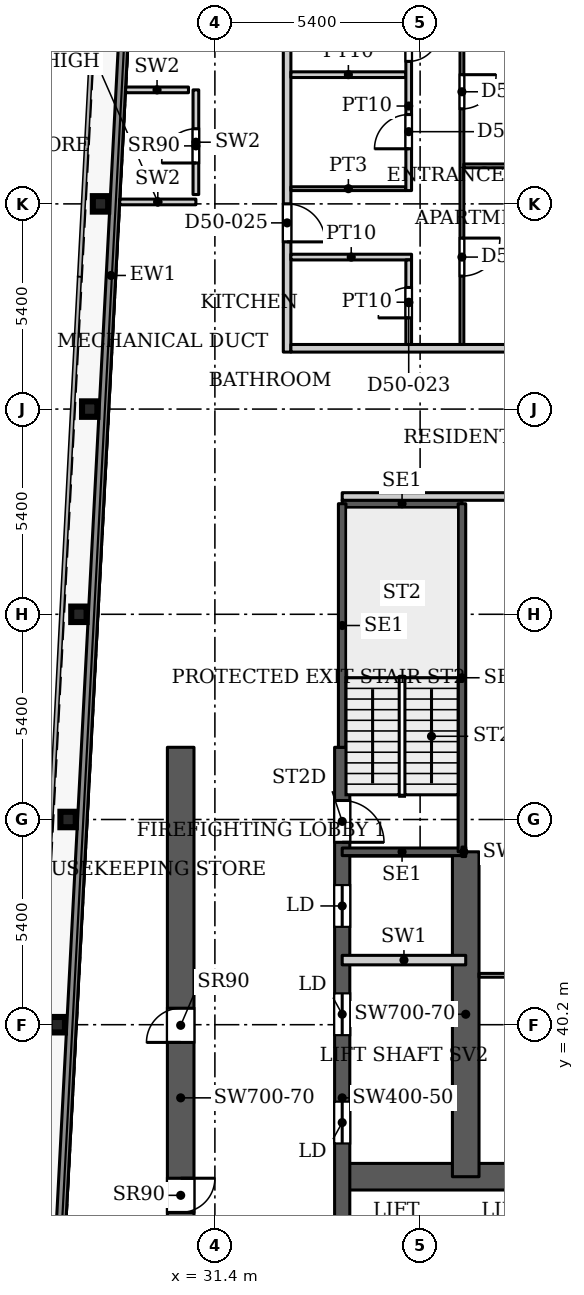
"""IFC4 building model, lengths in metres.
Left out: names, types, materials, properties, quantities, classifications, styles, units other than length and angle.
Written with IfcOpenShell. Run it as: python <this file> out.ifc"""

import sys

from ifc_helpers import new_model, si_unit, direction, frame, frame_2d, origin, origin_2d, place, context, subcontext, project, spatial, rectangle, i_section, extrude, source, transform, mapped, element, fill, save


model = new_model("IFC4")
c1 = context("Model", 3, precision=1e-05, world=origin(), true_north=direction((0.0, 1.0)))
c2 = subcontext(c1, "Body", "Model", "MODEL_VIEW")
j1 = project(units=[si_unit("LENGTHUNIT", "METRE"), si_unit("PLANEANGLEUNIT", "RADIAN")], contexts=[c1])
p1 = place(None, origin())
s1 = spatial("IfcSite", under=j1, at=p1, CompositionType="ELEMENT")
p2 = place(p1, origin())
s2 = spatial("IfcBuilding", under=s1, at=p2, CompositionType="ELEMENT")
p3 = place(p2, frame((0.0, 0.0, 216.2)))
s3 = spatial("IfcBuildingStorey", under=s2, at=p3, CompositionType="ELEMENT", Elevation=216.2)
for number, where, z_axis, x_axis in (
    (1, (27.253, 40.2, 0.0), (0.0, 0.0, 1.0), (1.0, 0.0, 0.0)),
    (2, (27.537, 45.6, 0.0), (0.0, 0.0, 1.0), (1.0, 0.0, 0.0)),
    (3, (27.822, 51.0, 0.0), (0.0, 0.0, 1.0), (1.0, 0.0, 0.0)),
    (4, (28.106, 56.4, 0.0), (0.0, 0.0, 1.0), (1.0, 0.0, 0.0)),
    (5, (28.39, 61.8, 0.0), (0.0, 0.0, 1.0), (1.0, 0.0, 0.0)),
):
    element("IfcColumn", number, at=place(p3, frame(where, z_axis=z_axis, x_axis=x_axis)), inside=s3, PredefinedType="COLUMN", context=c2, shape_type="SweptSolid", body=[
        extrude(i_section(OverallWidth=0.404, OverallDepth=0.407, WebThickness=0.027, FlangeThickness=0.044, FilletRadius=0.012, at=origin_2d()), origin(), (0.0, 0.0, 1.0), 3.9),
    ])
p4 = place(p3, frame((34.75, 36.2, 0.0), z_axis=(0.0, 0.0, 1.0), x_axis=(1.0, 0.0, 0.0)))
e6 = element("IfcWall", 6, at=p4, inside=s3, PredefinedType="SHEAR", context=c2, shape_type="SweptSolid", body=[
    extrude(rectangle(XDim=18.4, YDim=0.7, at=frame_2d((9.2, 0.0))), origin(), (0.0, 0.0, 1.0), 3.9),
])
p5 = place(p4, frame((16.9, 0.0, 0.0)))
e7 = element("IfcOpeningElement", 7, at=p5, cuts=e6, PredefinedType="OPENING", context=c2, shape_type="SweptSolid", body=[
    extrude(rectangle(XDim=1.0, YDim=2.2, at=frame_2d((0.5, 1.1))), frame((0.0, 0.36, 0.0), z_axis=(0.0, -1.0, 0.0), x_axis=(1.0, 0.0, 0.0)), (0.0, 0.0, 1.0), 0.72),
])
p6 = place(p3, frame((34.75, 29.05, 0.0), z_axis=(0.0, 0.0, 1.0), x_axis=(0.0, 1.0, 0.0)))
e8 = element("IfcWall", 8, at=p6, inside=s3, PredefinedType="SHEAR", context=c2, shape_type="SweptSolid", body=[
    extrude(rectangle(XDim=18.45, YDim=0.4, at=frame_2d((9.225, 0.0))), origin(), (0.0, 0.0, 1.0), 3.9),
])
p7 = place(p6, frame((8.025, 0.0, 0.0)))
e9 = element("IfcOpeningElement", 9, at=p7, cuts=e8, PredefinedType="OPENING", context=c2, shape_type="SweptSolid", body=[
    extrude(rectangle(XDim=1.1, YDim=2.2, at=frame_2d((0.55, 1.1))), frame((0.0, 0.21, 0.0), z_axis=(0.0, -1.0, 0.0), x_axis=(1.0, 0.0, 0.0)), (0.0, 0.0, 1.0), 0.42),
])
p8 = place(p6, frame((10.875, 0.0, 0.0)))
e10 = element("IfcOpeningElement", 10, at=p8, cuts=e8, PredefinedType="OPENING", context=c2, shape_type="SweptSolid", body=[
    extrude(rectangle(XDim=1.1, YDim=2.2, at=frame_2d((0.55, 1.1))), frame((0.0, 0.21, 0.0), z_axis=(0.0, -1.0, 0.0), x_axis=(1.0, 0.0, 0.0)), (0.0, 0.0, 1.0), 0.42),
])
p9 = place(p6, frame((13.725, 0.0, 0.0)))
e11 = element("IfcOpeningElement", 11, at=p9, cuts=e8, PredefinedType="OPENING", context=c2, shape_type="SweptSolid", body=[
    extrude(rectangle(XDim=1.1, YDim=2.2, at=frame_2d((0.55, 1.1))), frame((0.0, 0.21, 0.0), z_axis=(0.0, -1.0, 0.0), x_axis=(1.0, 0.0, 0.0)), (0.0, 0.0, 1.0), 0.42),
])
p10 = place(p6, frame((15.95, 0.0, 0.0)))
e12 = element("IfcOpeningElement", 12, at=p10, cuts=e8, PredefinedType="OPENING", context=c2, shape_type="SweptSolid", body=[
    extrude(rectangle(XDim=1.1, YDim=2.2, at=frame_2d((0.55, 1.1))), frame((0.0, 0.21, 0.0), z_axis=(0.0, -1.0, 0.0), x_axis=(1.0, 0.0, 0.0)), (0.0, 0.0, 1.0), 0.42),
])
p11 = place(p3, frame((38.0, 36.2, 0.0), z_axis=(0.0, 0.0, 1.0), x_axis=(0.0, 1.0, 0.0)))
e13 = element("IfcWall", 13, at=p11, inside=s3, PredefinedType="SHEAR", context=c2, shape_type="SweptSolid", body=[
    extrude(rectangle(XDim=8.55, YDim=0.7, at=frame_2d((4.275, 0.0))), origin(), (0.0, 0.0, 1.0), 3.9),
])
p12 = place(p3, frame((30.5, 29.05, 0.0), z_axis=(0.0, 0.0, 1.0), x_axis=(0.0, 1.0, 0.0)))
e14 = element("IfcWall", 14, at=p12, inside=s3, PredefinedType="SHEAR", context=c2, shape_type="SweptSolid", body=[
    extrude(rectangle(XDim=18.45, YDim=0.7, at=frame_2d((9.225, 0.0))), origin(), (0.0, 0.0, 1.0), 3.9),
])
p13 = place(p12, frame((6.21, 0.0, 0.0)))
e15 = element("IfcOpeningElement", 15, at=p13, cuts=e14, PredefinedType="OPENING", context=c2, shape_type="SweptSolid", body=[
    extrude(rectangle(XDim=0.9, YDim=2.2, at=frame_2d((0.45, 1.1))), frame((0.0, 0.36, 0.0), z_axis=(0.0, -1.0, 0.0), x_axis=(1.0, 0.0, 0.0)), (0.0, 0.0, 1.0), 0.72),
])
p14 = place(p12, frame((10.684, 0.0, 0.0)))
e16 = element("IfcOpeningElement", 16, at=p14, cuts=e14, PredefinedType="OPENING", context=c2, shape_type="SweptSolid", body=[
    extrude(rectangle(XDim=0.9, YDim=2.2, at=frame_2d((0.45, 1.1))), frame((0.0, 0.36, 0.0), z_axis=(0.0, -1.0, 0.0), x_axis=(1.0, 0.0, 0.0)), (0.0, 0.0, 1.0), 0.72),
])
p15 = place(p3, frame((27.195, 31.969, 0.0), z_axis=(0.0, 0.0, 1.0), x_axis=(0.052559748861, 0.998617781135, 0.0)))
e17 = element("IfcWall", 17, at=p15, inside=s3, PredefinedType="SOLIDWALL", context=c2, shape_type="SweptSolid", body=[
    extrude(rectangle(XDim=55.972, YDim=0.25, at=frame_2d((27.986, 0.0))), origin(), (0.0, 0.0, 1.0), 3.75),
])
for number, where, z_axis, x_axis in (
    (18, (34.75, 44.75, 0.0), (0.0, 0.0, 1.0), (1.0, 0.0, 0.0)),
    (19, (34.75, 53.91, 0.0), (0.0, 0.0, 1.0), (1.0, 0.0, 0.0)),
):
    element("IfcWall", number, at=place(p3, frame(where, z_axis=z_axis, x_axis=x_axis)), inside=s3, PredefinedType="SHEAR", context=c2, shape_type="SweptSolid", body=[
        extrude(rectangle(XDim=3.15, YDim=0.2, at=frame_2d((1.575, 0.0))), origin(), (0.0, 0.0, 1.0), 3.9),
    ])
p16 = place(p3, frame((34.75, 47.5, 0.0), z_axis=(0.0, 0.0, 1.0), x_axis=(0.0, 1.0, 0.0)))
e20 = element("IfcWall", 20, at=p16, inside=s3, PredefinedType="SHEAR", context=c2, shape_type="SweptSolid", body=[
    extrude(rectangle(XDim=6.41, YDim=0.2, at=frame_2d((3.205, 0.0))), origin(), (0.0, 0.0, 1.0), 3.9),
])
p17 = place(p3, frame((37.9, 44.75, 0.0), z_axis=(0.0, 0.0, 1.0), x_axis=(0.0, 1.0, 0.0)))
e21 = element("IfcWall", 21, at=p17, inside=s3, PredefinedType="SHEAR", context=c2, shape_type="SweptSolid", body=[
    extrude(rectangle(XDim=9.16, YDim=0.2, at=frame_2d((4.58, 0.0))), origin(), (0.0, 0.0, 1.0), 3.9),
])
p18 = place(p3, frame((34.75, 41.9, 0.0), z_axis=(0.0, 0.0, 1.0), x_axis=(1.0, 0.0, 0.0)))
e22 = element("IfcWall", 22, at=p18, inside=s3, PredefinedType="PARTITIONING", context=c2, shape_type="SweptSolid", body=[
    extrude(rectangle(XDim=3.25, YDim=0.25, at=frame_2d((1.625, 0.0))), origin(), (0.0, 0.0, 1.0), 3.9),
])
p19 = place(p3, frame((37.9, 44.75, 0.0), z_axis=(0.0, 0.0, 1.0), x_axis=(1.0, 0.0, 0.0)))
e23 = element("IfcWall", 23, at=p19, inside=s3, PredefinedType="PARTITIONING", context=c2, shape_type="SweptSolid", body=[
    extrude(rectangle(XDim=0.1, YDim=0.25, at=frame_2d((0.05, 0.0))), origin(), (0.0, 0.0, 1.0), 3.9),
])
p20 = place(p3, frame((28.896, 61.851, 0.0), z_axis=(0.0, 0.0, 1.0), x_axis=(1.0, 0.0, 0.0)))
e24 = element("IfcWall", 24, at=p20, inside=s3, PredefinedType="PARTITIONING", context=c2, shape_type="SweptSolid", body=[
    extrude(rectangle(XDim=2.004, YDim=0.15, at=frame_2d((1.002, 0.0))), origin(), (0.0, 0.0, 1.0), 3.072),
])
p21 = place(p3, frame((30.9, 62.046, 0.0), z_axis=(0.0, 0.0, 1.0), x_axis=(0.0, 1.0, 0.0)))
e25 = element("IfcWall", 25, at=p21, inside=s3, PredefinedType="PARTITIONING", context=c2, shape_type="SweptSolid", body=[
    extrude(rectangle(XDim=2.754, YDim=0.15, at=frame_2d((1.377, 0.0))), origin(), (0.0, 0.0, 1.0), 3.9),
])
p22 = place(p21, frame((0.83, 0.0, 0.0)))
e26 = element("IfcOpeningElement", 26, at=p22, cuts=e25, PredefinedType="OPENING", context=c2, shape_type="SweptSolid", body=[
    extrude(rectangle(XDim=0.9, YDim=2.2, at=frame_2d((0.45, 1.1))), frame((0.0, 0.085, 0.0), z_axis=(0.0, -1.0, 0.0), x_axis=(1.0, 0.0, 0.0)), (0.0, 0.0, 1.0), 0.17),
])
p23 = place(p3, frame((29.051, 64.8, 0.0), z_axis=(0.0, 0.0, 1.0), x_axis=(1.0, 0.0, 0.0)))
e27 = element("IfcWall", 27, at=p23, inside=s3, PredefinedType="PARTITIONING", context=c2, shape_type="SweptSolid", body=[
    extrude(rectangle(XDim=1.654, YDim=0.15, at=frame_2d((0.827, 0.0))), origin(), (0.0, 0.0, 1.0), 3.9),
])
p24 = place(p3, frame((33.3, 57.9, 0.0), z_axis=(0.0, 0.0, 1.0), x_axis=(0.0, 1.0, 0.0)))
e28 = element("IfcWall", 28, at=p24, inside=s3, PredefinedType="PARTITIONING", context=c2, shape_type="SweptSolid", body=[
    extrude(rectangle(XDim=17.6, YDim=0.2, at=frame_2d((8.8, 0.0))), origin(), (0.0, 0.0, 1.0), 3.6),
])
p25 = place(p24, frame((2.9, 0.0, 0.0)))
e29 = element("IfcOpeningElement", 29, at=p25, cuts=e28, PredefinedType="OPENING", context=c2, shape_type="SweptSolid", body=[
    extrude(rectangle(XDim=1.0, YDim=2.1, at=frame_2d((0.5, 1.05))), frame((0.0, 0.11, 0.0), z_axis=(0.0, -1.0, 0.0), x_axis=(1.0, 0.0, 0.0)), (0.0, 0.0, 1.0), 0.22),
])
p26 = place(p24, frame((10.7, 0.0, 0.0)))
e30 = element("IfcOpeningElement", 30, at=p26, cuts=e28, PredefinedType="OPENING", context=c2, shape_type="SweptSolid", body=[
    extrude(rectangle(XDim=1.0, YDim=2.1, at=frame_2d((0.5, 1.05))), frame((0.0, 0.11, 0.0), z_axis=(0.0, -1.0, 0.0), x_axis=(1.0, 0.0, 0.0)), (0.0, 0.0, 1.0), 0.22),
])
p27 = place(p3, frame((33.4, 58.0, 0.0), z_axis=(0.0, 0.0, 1.0), x_axis=(1.0, 0.0, 0.0)))
e31 = element("IfcWall", 31, at=p27, inside=s3, PredefinedType="PARTITIONING", context=c2, shape_type="SweptSolid", body=[
    extrude(rectangle(XDim=12.5, YDim=0.2, at=frame_2d((6.25, 0.0))), origin(), (0.0, 0.0, 1.0), 3.6),
])
p28 = place(p3, frame((33.4, 60.4, 0.0), z_axis=(0.0, 0.0, 1.0), x_axis=(1.0, 0.0, 0.0)))
e32 = element("IfcWall", 32, at=p28, inside=s3, PredefinedType="PARTITIONING", context=c2, shape_type="SweptSolid", body=[
    extrude(rectangle(XDim=3.175, YDim=0.15, at=frame_2d((1.587, 0.0))), origin(), (0.0, 0.0, 1.0), 3.6),
])
p29 = place(p3, frame((33.4, 62.2, 0.0), z_axis=(0.0, 0.0, 1.0), x_axis=(1.0, 0.0, 0.0)))
e33 = element("IfcWall", 33, at=p29, inside=s3, PredefinedType="PARTITIONING", context=c2, shape_type="SweptSolid", body=[
    extrude(rectangle(XDim=3.025, YDim=0.1, at=frame_2d((1.513, 0.0))), origin(), (0.0, 0.0, 1.0), 3.6),
])
p30 = place(p3, frame((33.4, 65.2, 0.0), z_axis=(0.0, 0.0, 1.0), x_axis=(1.0, 0.0, 0.0)))
e34 = element("IfcWall", 34, at=p30, inside=s3, PredefinedType="PARTITIONING", context=c2, shape_type="SweptSolid", body=[
    extrude(rectangle(XDim=3.025, YDim=0.15, at=frame_2d((1.513, 0.0))), origin(), (0.0, 0.0, 1.0), 3.6),
])
p31 = place(p3, frame((34.75, 54.1, 0.0), z_axis=(0.0, 0.0, 1.0), x_axis=(1.0, 0.0, 0.0)))
e35 = element("IfcWall", 35, at=p31, inside=s3, PredefinedType="PARTITIONING", context=c2, shape_type="SweptSolid", body=[
    extrude(rectangle(XDim=11.15, YDim=0.2, at=frame_2d((5.575, 0.0))), origin(), (0.0, 0.0, 1.0), 3.6),
])
p32 = place(p31, frame((5.075, 0.0, 0.0)))
e36 = element("IfcOpeningElement", 36, at=p32, cuts=e35, PredefinedType="OPENING", context=c2, shape_type="SweptSolid", body=[
    extrude(rectangle(XDim=1.0, YDim=2.1, at=frame_2d((0.5, 1.05))), frame((0.0, 0.11, 0.0), z_axis=(0.0, -1.0, 0.0), x_axis=(1.0, 0.0, 0.0)), (0.0, 0.0, 1.0), 0.22),
])
p33 = place(p3, frame((36.5, 58.1, 0.0), z_axis=(0.0, 0.0, 1.0), x_axis=(0.0, 1.0, 0.0)))
e37 = element("IfcWall", 37, at=p33, inside=s3, PredefinedType="PARTITIONING", context=c2, shape_type="SweptSolid", body=[
    extrude(rectangle(XDim=2.225, YDim=0.15, at=frame_2d((1.112, 0.0))), origin(), (0.0, 0.0, 1.0), 3.6),
])
p34 = place(p33, frame((0.7, 0.0, 0.0)))
e38 = element("IfcOpeningElement", 38, at=p34, cuts=e37, PredefinedType="OPENING", context=c2, shape_type="SweptSolid", body=[
    extrude(rectangle(XDim=0.8, YDim=2.1, at=frame_2d((0.4, 1.05))), frame((0.0, 0.085, 0.0), z_axis=(0.0, -1.0, 0.0), x_axis=(1.0, 0.0, 0.0)), (0.0, 0.0, 1.0), 0.17),
])
p35 = place(p3, frame((36.5, 62.15, 0.0), z_axis=(0.0, 0.0, 1.0), x_axis=(0.0, 1.0, 0.0)))
e39 = element("IfcWall", 39, at=p35, inside=s3, PredefinedType="PARTITIONING", context=c2, shape_type="SweptSolid", body=[
    extrude(rectangle(XDim=4.45, YDim=0.15, at=frame_2d((2.225, 0.0))), origin(), (0.0, 0.0, 1.0), 3.6),
])
p36 = place(p35, frame((1.1, 0.0, 0.0)))
e40 = element("IfcOpeningElement", 40, at=p36, cuts=e39, PredefinedType="OPENING", context=c2, shape_type="SweptSolid", body=[
    extrude(rectangle(XDim=0.9, YDim=2.1, at=frame_2d((0.45, 1.05))), frame((0.0, 0.085, 0.0), z_axis=(0.0, -1.0, 0.0), x_axis=(1.0, 0.0, 0.0)), (0.0, 0.0, 1.0), 0.17),
])
p37 = place(p35, frame((3.4, 0.0, 0.0)))
e41 = element("IfcOpeningElement", 41, at=p37, cuts=e39, PredefinedType="OPENING", context=c2, shape_type="SweptSolid", body=[
    extrude(rectangle(XDim=0.8, YDim=2.1, at=frame_2d((0.4, 1.05))), frame((0.0, 0.085, 0.0), z_axis=(0.0, -1.0, 0.0), x_axis=(1.0, 0.0, 0.0)), (0.0, 0.0, 1.0), 0.17),
])
p38 = place(p3, frame((37.9, 58.1, 0.0), z_axis=(0.0, 0.0, 1.0), x_axis=(0.0, 1.0, 0.0)))
e42 = element("IfcWall", 42, at=p38, inside=s3, PredefinedType="PARTITIONING", context=c2, shape_type="SweptSolid", body=[
    extrude(rectangle(XDim=8.5, YDim=0.1, at=frame_2d((4.25, 0.0))), origin(), (0.0, 0.0, 1.0), 3.6),
])
p39 = place(p38, frame((6.2, 0.0, 0.0)))
e43 = element("IfcOpeningElement", 43, at=p39, cuts=e42, PredefinedType="OPENING", context=c2, shape_type="SweptSolid", body=[
    extrude(rectangle(XDim=0.9, YDim=2.1, at=frame_2d((0.45, 1.05))), frame((0.0, 0.06, 0.0), z_axis=(0.0, -1.0, 0.0), x_axis=(1.0, 0.0, 0.0)), (0.0, 0.0, 1.0), 0.12),
])
p40 = place(p38, frame((1.8, 0.0, 0.0)))
e44 = element("IfcOpeningElement", 44, at=p40, cuts=e42, PredefinedType="OPENING", context=c2, shape_type="SweptSolid", body=[
    extrude(rectangle(XDim=1.0, YDim=2.1, at=frame_2d((0.5, 1.05))), frame((0.0, 0.06, 0.0), z_axis=(0.0, -1.0, 0.0), x_axis=(1.0, 0.0, 0.0)), (0.0, 0.0, 1.0), 0.12),
])
p41 = place(p3, frame((37.95, 62.8, 0.0), z_axis=(0.0, 0.0, 1.0), x_axis=(1.0, 0.0, 0.0)))
e45 = element("IfcWall", 45, at=p41, inside=s3, PredefinedType="PARTITIONING", context=c2, shape_type="SweptSolid", body=[
    extrude(rectangle(XDim=7.95, YDim=0.1, at=frame_2d((3.975, 0.0))), origin(), (0.0, 0.0, 1.0), 3.6),
])
p42 = place(p3, frame((38.349, 41.5, 0.0), z_axis=(0.0, 0.0, 1.0), x_axis=(1.0, 0.0, 0.0)))
e46 = element("IfcWall", 46, at=p42, inside=s3, PredefinedType="PARTITIONING", context=c2, shape_type="SweptSolid", body=[
    extrude(rectangle(XDim=14.951, YDim=0.1, at=frame_2d((7.476, 0.0))), origin(), (0.0, 0.0, 1.0), 3.6),
])
p43 = place(p42, frame((6.851, 0.0, 0.0)))
e47 = element("IfcOpeningElement", 47, at=p43, cuts=e46, PredefinedType="OPENING", context=c2, shape_type="SweptSolid", body=[
    extrude(rectangle(XDim=1.0, YDim=2.1, at=frame_2d((0.5, 1.05))), frame((0.0, 0.06, 0.0), z_axis=(0.0, -1.0, 0.0), x_axis=(1.0, 0.0, 0.0)), (0.0, 0.0, 1.0), 0.12),
])
m1 = source(origin(), c2, "Body", "SweptSolid", [
    extrude(rectangle(XDim=1.1, YDim=2.2, at=frame_2d((0.55, 1.1))), frame((0.0, 0.025, 0.0), z_axis=(0.0, -1.0, 0.0), x_axis=(1.0, 0.0, 0.0)), (0.0, 0.0, 1.0), 0.05),
])
p44 = place(p7, origin())
e48 = element("IfcDoor", 48, at=p44, inside=s3, OperationType="SLIDING_TO_LEFT", PredefinedType="DOOR", context=c2, shape_type="MappedRepresentation", body=[
    mapped(m1, transform((0.0, 0.0, 0.0), x_axis=(1.0, 0.0, 0.0), y_axis=(0.0, 1.0, 0.0), z_axis=(0.0, 0.0, 1.0), scale=1.0)),
])
fill(e9, e48)
p45 = place(p8, origin())
e49 = element("IfcDoor", 49, at=p45, inside=s3, OperationType="SLIDING_TO_LEFT", PredefinedType="DOOR", context=c2, shape_type="MappedRepresentation", body=[
    mapped(m1, transform((0.0, 0.0, 0.0), x_axis=(1.0, 0.0, 0.0), y_axis=(0.0, 1.0, 0.0), z_axis=(0.0, 0.0, 1.0), scale=1.0)),
])
fill(e10, e49)
p46 = place(p9, origin())
e50 = element("IfcDoor", 50, at=p46, inside=s3, OperationType="SLIDING_TO_LEFT", PredefinedType="DOOR", context=c2, shape_type="MappedRepresentation", body=[
    mapped(m1, transform((0.0, 0.0, 0.0), x_axis=(1.0, 0.0, 0.0), y_axis=(0.0, 1.0, 0.0), z_axis=(0.0, 0.0, 1.0), scale=1.0)),
])
fill(e11, e50)
m2 = source(origin(), c2, "Body", "SweptSolid", [
    extrude(rectangle(XDim=0.9, YDim=2.2, at=frame_2d((0.45, 1.1))), frame((0.0, 0.025, 0.0), z_axis=(0.0, -1.0, 0.0), x_axis=(1.0, 0.0, 0.0)), (0.0, 0.0, 1.0), 0.05),
])
p47 = place(p13, origin())
e51 = element("IfcDoor", 51, at=p47, inside=s3, OperationType="SINGLE_SWING_RIGHT", PredefinedType="DOOR", context=c2, shape_type="MappedRepresentation", body=[
    mapped(m2, transform((0.0, 0.0, 0.0), x_axis=(1.0, 0.0, 0.0), y_axis=(0.0, 1.0, 0.0), z_axis=(0.0, 0.0, 1.0), scale=1.0)),
])
fill(e15, e51)
p48 = place(p14, origin())
e52 = element("IfcDoor", 52, at=p48, inside=s3, OperationType="SINGLE_SWING_LEFT", PredefinedType="DOOR", context=c2, shape_type="MappedRepresentation", body=[
    mapped(m2, transform((0.0, 0.0, 0.0), x_axis=(1.0, 0.0, 0.0), y_axis=(0.0, 1.0, 0.0), z_axis=(0.0, 0.0, 1.0), scale=1.0)),
])
fill(e16, e52)
p49 = place(p22, origin())
e53 = element("IfcDoor", 53, at=p49, inside=s3, OperationType="SINGLE_SWING_LEFT", PredefinedType="DOOR", context=c2, shape_type="MappedRepresentation", body=[
    mapped(m2, transform((0.0, 0.0, 0.0), x_axis=(1.0, 0.0, 0.0), y_axis=(0.0, 1.0, 0.0), z_axis=(0.0, 0.0, 1.0), scale=1.0)),
])
fill(e26, e53)
m3 = source(origin(), c2, "Body", "SweptSolid", [
    extrude(rectangle(XDim=1.1, YDim=2.2, at=frame_2d((0.55, 1.1))), frame((0.0, 0.025, 0.0), z_axis=(0.0, -1.0, 0.0), x_axis=(1.0, 0.0, 0.0)), (0.0, 0.0, 1.0), 0.05),
])
p50 = place(p10, origin())
e54 = element("IfcDoor", 54, at=p50, inside=s3, OperationType="SINGLE_SWING_RIGHT", PredefinedType="DOOR", context=c2, shape_type="MappedRepresentation", body=[
    mapped(m3, transform((0.0, 0.0, 0.0), x_axis=(1.0, 0.0, 0.0), y_axis=(0.0, 1.0, 0.0), z_axis=(0.0, 0.0, 1.0), scale=1.0)),
])
fill(e12, e54)
m4 = source(origin(), c2, "Body", "SweptSolid", [
    extrude(rectangle(XDim=0.8, YDim=2.1, at=frame_2d((0.4, 1.05))), frame((0.0, 0.025, 0.0), z_axis=(0.0, -1.0, 0.0), x_axis=(1.0, 0.0, 0.0)), (0.0, 0.0, 1.0), 0.05),
])
p51 = place(p34, origin())
e55 = element("IfcDoor", 55, at=p51, inside=s3, OperationType="SINGLE_SWING_LEFT", PredefinedType="DOOR", context=c2, shape_type="MappedRepresentation", body=[
    mapped(m4, transform((0.0, 0.0, 0.0), x_axis=(1.0, 0.0, 0.0), y_axis=(0.0, 1.0, 0.0), z_axis=(0.0, 0.0, 1.0), scale=1.0)),
])
fill(e38, e55)
m5 = source(origin(), c2, "Body", "SweptSolid", [
    extrude(rectangle(XDim=0.9, YDim=2.1, at=frame_2d((0.45, 1.05))), frame((0.0, 0.025, 0.0), z_axis=(0.0, -1.0, 0.0), x_axis=(1.0, 0.0, 0.0)), (0.0, 0.0, 1.0), 0.05),
])
p52 = place(p39, origin())
e56 = element("IfcDoor", 56, at=p52, inside=s3, OperationType="SINGLE_SWING_RIGHT", PredefinedType="DOOR", context=c2, shape_type="MappedRepresentation", body=[
    mapped(m5, transform((0.0, 0.0, 0.0), x_axis=(1.0, 0.0, 0.0), y_axis=(0.0, 1.0, 0.0), z_axis=(0.0, 0.0, 1.0), scale=1.0)),
])
fill(e43, e56)
m6 = source(origin(), c2, "Body", "SweptSolid", [
    extrude(rectangle(XDim=1.0, YDim=2.1, at=frame_2d((0.5, 1.05))), frame((0.0, 0.025, 0.0), z_axis=(0.0, -1.0, 0.0), x_axis=(1.0, 0.0, 0.0)), (0.0, 0.0, 1.0), 0.05),
])
p53 = place(p25, origin())
e57 = element("IfcDoor", 57, at=p53, inside=s3, OperationType="SINGLE_SWING_RIGHT", PredefinedType="DOOR", context=c2, shape_type="MappedRepresentation", body=[
    mapped(m6, transform((0.0, 0.0, 0.0), x_axis=(1.0, 0.0, 0.0), y_axis=(0.0, 1.0, 0.0), z_axis=(0.0, 0.0, 1.0), scale=1.0)),
])
fill(e29, e57)
p54 = place(p36, origin())
e58 = element("IfcDoor", 58, at=p54, inside=s3, OperationType="SINGLE_SWING_LEFT", PredefinedType="DOOR", context=c2, shape_type="MappedRepresentation", body=[
    mapped(m5, transform((0.0, 0.0, 0.0), x_axis=(1.0, 0.0, 0.0), y_axis=(0.0, 1.0, 0.0), z_axis=(0.0, 0.0, 1.0), scale=1.0)),
])
fill(e40, e58)
m7 = source(origin(), c2, "Body", "SweptSolid", [
    extrude(rectangle(XDim=1.0, YDim=2.1, at=frame_2d((0.5, 1.05))), frame((0.0, 0.025, 0.0), z_axis=(0.0, -1.0, 0.0), x_axis=(1.0, 0.0, 0.0)), (0.0, 0.0, 1.0), 0.05),
])
p55 = place(p40, origin())
e59 = element("IfcDoor", 59, at=p55, inside=s3, OperationType="SINGLE_SWING_RIGHT", PredefinedType="DOOR", context=c2, shape_type="MappedRepresentation", body=[
    mapped(m7, transform((0.0, 0.0, 0.0), x_axis=(1.0, 0.0, 0.0), y_axis=(0.0, 1.0, 0.0), z_axis=(0.0, 0.0, 1.0), scale=1.0)),
])
fill(e44, e59)
p56 = place(p37, origin())
e60 = element("IfcDoor", 60, at=p56, inside=s3, OperationType="SINGLE_SWING_RIGHT", PredefinedType="DOOR", context=c2, shape_type="MappedRepresentation", body=[
    mapped(m4, transform((0.0, 0.0, 0.0), x_axis=(1.0, 0.0, 0.0), y_axis=(0.0, 1.0, 0.0), z_axis=(0.0, 0.0, 1.0), scale=1.0)),
])
fill(e41, e60)
save(model, sys.argv[1])
